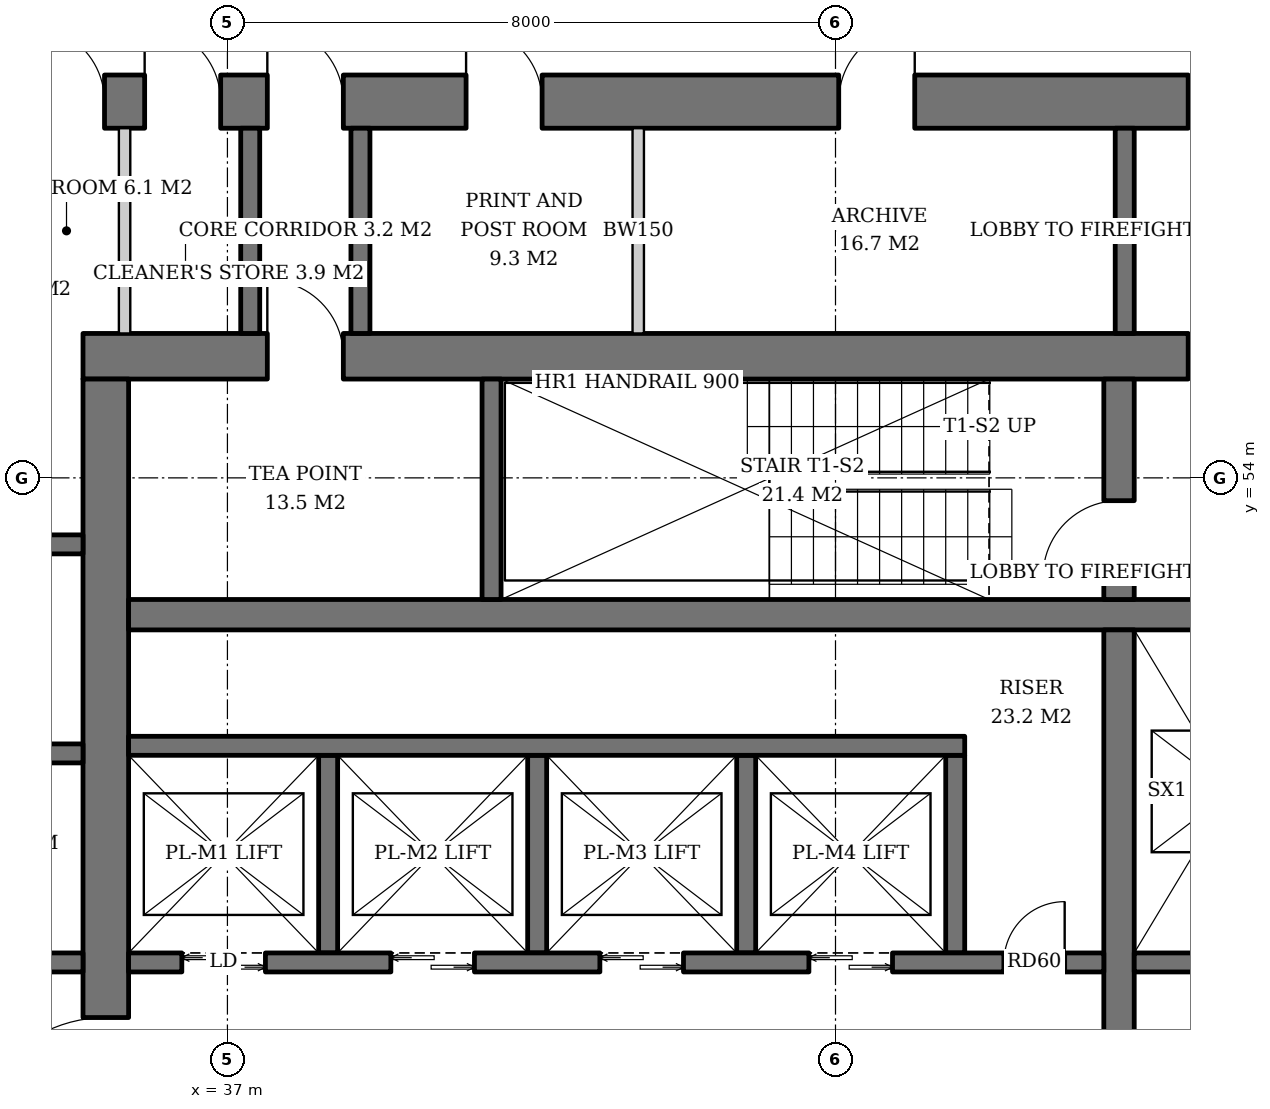
"""IFC4 building model, lengths in metres.
Left out: names, types, materials, properties, quantities, classifications, styles, units other than length and angle.
Written with IfcOpenShell. Run it as: python <this file> out.ifc"""

import sys

from ifc_helpers import new_model, si_unit, direction, frame, frame_2d, origin, place, context, subcontext, project, spatial, rectangle, extrude, element, fill, save


model = new_model("IFC4")
c1 = context("Model", 3, precision=1e-05, world=origin(), true_north=direction((0.0, 1.0)))
c2 = subcontext(c1, "Body", "Model", "MODEL_VIEW")
j1 = project(units=[si_unit("LENGTHUNIT", "METRE"), si_unit("PLANEANGLEUNIT", "RADIAN")], contexts=[c1])
p1 = place(None, origin())
s1 = spatial("IfcSite", under=j1, at=p1, CompositionType="ELEMENT")
p2 = place(p1, origin())
s2 = spatial("IfcBuilding", under=s1, at=p2, CompositionType="ELEMENT")
p3 = place(p2, frame((0.0, 0.0, 150.2)))
s3 = spatial("IfcBuildingStorey", under=s2, at=p3, CompositionType="ELEMENT", Elevation=150.2)
p4 = place(p3, frame((35.1, 55.6, 0.0), z_axis=(0.0, 0.0, 1.0), x_axis=(1.0, 0.0, 0.0)))
e1 = element("IfcWall", 1, at=p4, inside=s3, PredefinedType="SHEAR", context=c2, shape_type="SweptSolid", body=[
    extrude(rectangle(XDim=19.8, YDim=0.6, at=frame_2d((9.9, 0.0))), origin(), (0.0, 0.0, 1.0), 3.8),
])
p5 = place(p4, frame((14.54, 0.0, 0.0)))
e2 = element("IfcOpeningElement", 2, at=p5, cuts=e1, PredefinedType="OPENING", context=c2, shape_type="SweptSolid", body=[
    extrude(rectangle(XDim=1.0, YDim=2.1, at=frame_2d((0.5, 1.05))), frame((0.0, 0.31, 0.0), z_axis=(0.0, -1.0, 0.0), x_axis=(1.0, 0.0, 0.0)), (0.0, 0.0, 1.0), 0.62),
])
p6 = place(p4, frame((2.425, 0.0, 0.0)))
e3 = element("IfcOpeningElement", 3, at=p6, cuts=e1, PredefinedType="OPENING", context=c2, shape_type="SweptSolid", body=[
    extrude(rectangle(XDim=1.0, YDim=2.1, at=frame_2d((0.5, 1.05))), frame((0.0, 0.31, 0.0), z_axis=(0.0, -1.0, 0.0), x_axis=(1.0, 0.0, 0.0)), (0.0, 0.0, 1.0), 0.62),
])
p7 = place(p3, frame((35.4, 36.7, 0.0), z_axis=(0.0, 0.0, 1.0), x_axis=(0.0, 1.0, 0.0)))
e4 = element("IfcWall", 4, at=p7, inside=s3, PredefinedType="SHEAR", context=c2, shape_type="SweptSolid", body=[
    extrude(rectangle(XDim=18.6, YDim=0.6, at=frame_2d((9.3, 0.0))), origin(), (0.0, 0.0, 1.0), 3.8),
])
p8 = place(p7, frame((8.4, 0.0, 0.0)))
e5 = element("IfcOpeningElement", 5, at=p8, cuts=e4, PredefinedType="OPENING", context=c2, shape_type="SweptSolid", body=[
    extrude(rectangle(XDim=1.8, YDim=2.4, at=frame_2d((0.9, 1.2))), frame((0.0, 0.31, 0.0), z_axis=(0.0, -1.0, 0.0), x_axis=(1.0, 0.0, 0.0)), (0.0, 0.0, 1.0), 0.62),
])
p9 = place(p3, frame((31.7, 58.95, 0.0), z_axis=(0.0, 0.0, 1.0), x_axis=(1.0, 0.0, 0.0)))
e6 = element("IfcWall", 6, at=p9, inside=s3, PredefinedType="SHEAR", context=c2, shape_type="SweptSolid", body=[
    extrude(rectangle(XDim=26.6, YDim=0.7, at=frame_2d((13.3, 0.0))), origin(), (0.0, 0.0, 1.0), 3.8),
])
p10 = place(p9, frame((17.94, 0.0, 0.0)))
e7 = element("IfcOpeningElement", 7, at=p10, cuts=e6, PredefinedType="OPENING", context=c2, shape_type="SweptSolid", body=[
    extrude(rectangle(XDim=1.0, YDim=2.1, at=frame_2d((0.5, 1.05))), frame((0.0, 0.36, 0.0), z_axis=(0.0, -1.0, 0.0), x_axis=(1.0, 0.0, 0.0)), (0.0, 0.0, 1.0), 0.72),
])
p11 = place(p9, frame((5.825, 0.0, 0.0)))
e8 = element("IfcOpeningElement", 8, at=p11, cuts=e6, PredefinedType="OPENING", context=c2, shape_type="SweptSolid", body=[
    extrude(rectangle(XDim=1.0, YDim=2.1, at=frame_2d((0.5, 1.05))), frame((0.0, 0.36, 0.0), z_axis=(0.0, -1.0, 0.0), x_axis=(1.0, 0.0, 0.0)), (0.0, 0.0, 1.0), 0.72),
])
p12 = place(p9, frame((1.169, 0.0, 0.0)))
e9 = element("IfcOpeningElement", 9, at=p12, cuts=e6, PredefinedType="OPENING", context=c2, shape_type="SweptSolid", body=[
    extrude(rectangle(XDim=1.0, YDim=2.1, at=frame_2d((0.5, 1.05))), frame((0.0, 0.36, 0.0), z_axis=(0.0, -1.0, 0.0), x_axis=(1.0, 0.0, 0.0)), (0.0, 0.0, 1.0), 0.72),
])
p13 = place(p9, frame((2.683, 0.0, 0.0)))
e10 = element("IfcOpeningElement", 10, at=p13, cuts=e6, PredefinedType="OPENING", context=c2, shape_type="SweptSolid", body=[
    extrude(rectangle(XDim=1.0, YDim=2.1, at=frame_2d((0.5, 1.05))), frame((0.0, 0.36, 0.0), z_axis=(0.0, -1.0, 0.0), x_axis=(1.0, 0.0, 0.0)), (0.0, 0.0, 1.0), 0.72),
])
p14 = place(p9, frame((4.211, 0.0, 0.0)))
e11 = element("IfcOpeningElement", 11, at=p14, cuts=e6, PredefinedType="OPENING", context=c2, shape_type="SweptSolid", body=[
    extrude(rectangle(XDim=1.0, YDim=2.1, at=frame_2d((0.5, 1.05))), frame((0.0, 0.36, 0.0), z_axis=(0.0, -1.0, 0.0), x_axis=(1.0, 0.0, 0.0)), (0.0, 0.0, 1.0), 0.72),
])
p15 = place(p9, frame((8.44, 0.0, 0.0)))
e12 = element("IfcOpeningElement", 12, at=p15, cuts=e6, PredefinedType="OPENING", context=c2, shape_type="SweptSolid", body=[
    extrude(rectangle(XDim=1.0, YDim=2.1, at=frame_2d((0.5, 1.05))), frame((0.0, 0.36, 0.0), z_axis=(0.0, -1.0, 0.0), x_axis=(1.0, 0.0, 0.0)), (0.0, 0.0, 1.0), 0.72),
])
p16 = place(p9, frame((13.342, 0.0, 0.0)))
e13 = element("IfcOpeningElement", 13, at=p16, cuts=e6, PredefinedType="OPENING", context=c2, shape_type="SweptSolid", body=[
    extrude(rectangle(XDim=1.0, YDim=2.1, at=frame_2d((0.5, 1.05))), frame((0.0, 0.36, 0.0), z_axis=(0.0, -1.0, 0.0), x_axis=(1.0, 0.0, 0.0)), (0.0, 0.0, 1.0), 0.72),
])
p17 = place(p9, frame((22.4, 0.0, 0.0)))
e14 = element("IfcOpeningElement", 14, at=p17, cuts=e6, PredefinedType="OPENING", context=c2, shape_type="SweptSolid", body=[
    extrude(rectangle(XDim=1.0, YDim=2.1, at=frame_2d((0.5, 1.05))), frame((0.0, 0.36, 0.0), z_axis=(0.0, -1.0, 0.0), x_axis=(1.0, 0.0, 0.0)), (0.0, 0.0, 1.0), 0.72),
])
p18 = place(p3, frame((35.7, 52.2, 0.0), z_axis=(0.0, 0.0, 1.0), x_axis=(1.0, 0.0, 0.0)))
e15 = element("IfcWall", 15, at=p18, inside=s3, PredefinedType="SHEAR", context=c2, shape_type="SweptSolid", body=[
    extrude(rectangle(XDim=18.6, YDim=0.4, at=frame_2d((9.3, 0.0))), origin(), (0.0, 0.0, 1.0), 3.8),
])
p19 = place(p3, frame((48.73, 40.0, 0.0), z_axis=(0.0, 0.0, 1.0), x_axis=(0.0, 1.0, 0.0)))
e16 = element("IfcWall", 16, at=p19, inside=s3, PredefinedType="SHEAR", context=c2, shape_type="SweptSolid", body=[
    extrude(rectangle(XDim=12.0, YDim=0.4, at=frame_2d((6.0, 0.0))), origin(), (0.0, 0.0, 1.0), 3.8),
])
p20 = place(p3, frame((48.73, 52.4, 0.0), z_axis=(0.0, 0.0, 1.0), x_axis=(0.0, 1.0, 0.0)))
e17 = element("IfcWall", 17, at=p20, inside=s3, PredefinedType="SHEAR", context=c2, shape_type="SweptSolid", body=[
    extrude(rectangle(XDim=2.9, YDim=0.4, at=frame_2d((1.45, 0.0))), origin(), (0.0, 0.0, 1.0), 3.8),
])
p21 = place(p20, frame((0.3, 0.0, 0.0)))
e18 = element("IfcOpeningElement", 18, at=p21, cuts=e17, PredefinedType="OPENING", context=c2, shape_type="SweptSolid", body=[
    extrude(rectangle(XDim=1.0, YDim=2.1, at=frame_2d((0.5, 1.05))), frame((0.0, 0.21, 0.0), z_axis=(0.0, -1.0, 0.0), x_axis=(1.0, 0.0, 0.0)), (0.0, 0.0, 1.0), 0.42),
])
p22 = place(p3, frame((40.475, 52.4, 0.0), z_axis=(0.0, 0.0, 1.0), x_axis=(0.0, 1.0, 0.0)))
e19 = element("IfcWall", 19, at=p22, inside=s3, PredefinedType="SHEAR", context=c2, shape_type="SweptSolid", body=[
    extrude(rectangle(XDim=2.9, YDim=0.25, at=frame_2d((1.45, 0.0))), origin(), (0.0, 0.0, 1.0), 3.8),
])
for number, where, z_axis, x_axis in (
    (20, (38.325, 47.75, 0.0), (0.0, 0.0, 1.0), (0.0, 1.0, 0.0)),
    (21, (41.075, 47.75, 0.0), (0.0, 0.0, 1.0), (0.0, 1.0, 0.0)),
    (22, (43.825, 47.75, 0.0), (0.0, 0.0, 1.0), (0.0, 1.0, 0.0)),
    (23, (46.575, 47.75, 0.0), (0.0, 0.0, 1.0), (0.0, 1.0, 0.0)),
):
    element("IfcWall", number, at=place(p3, frame(where, z_axis=z_axis, x_axis=x_axis)), inside=s3, PredefinedType="SHEAR", context=c2, shape_type="SweptSolid", body=[
        extrude(rectangle(XDim=2.6, YDim=0.25, at=frame_2d((1.3, 0.0))), origin(), (0.0, 0.0, 1.0), 3.8),
    ])
p23 = place(p3, frame((35.7, 50.475, 0.0), z_axis=(0.0, 0.0, 1.0), x_axis=(1.0, 0.0, 0.0)))
e24 = element("IfcWall", 24, at=p23, inside=s3, PredefinedType="SHEAR", context=c2, shape_type="SweptSolid", body=[
    extrude(rectangle(XDim=11.0, YDim=0.25, at=frame_2d((5.5, 0.0))), origin(), (0.0, 0.0, 1.0), 3.8),
])
p24 = place(p3, frame((35.7, 47.625, 0.0), z_axis=(0.0, 0.0, 1.0), x_axis=(1.0, 0.0, 0.0)))
e25 = element("IfcWall", 25, at=p24, inside=s3, PredefinedType="SHEAR", context=c2, shape_type="SweptSolid", body=[
    extrude(rectangle(XDim=12.83, YDim=0.25, at=frame_2d((6.415, 0.0))), origin(), (0.0, 0.0, 1.0), 3.8),
])
p25 = place(p24, frame((0.7, 0.0, 0.0)))
e26 = element("IfcOpeningElement", 26, at=p25, cuts=e25, PredefinedType="OPENING", context=c2, shape_type="SweptSolid", body=[
    extrude(rectangle(XDim=1.1, YDim=2.2, at=frame_2d((0.55, 1.1))), frame((0.0, 0.135, 0.0), z_axis=(0.0, -1.0, 0.0), x_axis=(1.0, 0.0, 0.0)), (0.0, 0.0, 1.0), 0.27),
])
p26 = place(p24, frame((3.45, 0.0, 0.0)))
e27 = element("IfcOpeningElement", 27, at=p26, cuts=e25, PredefinedType="OPENING", context=c2, shape_type="SweptSolid", body=[
    extrude(rectangle(XDim=1.1, YDim=2.2, at=frame_2d((0.55, 1.1))), frame((0.0, 0.135, 0.0), z_axis=(0.0, -1.0, 0.0), x_axis=(1.0, 0.0, 0.0)), (0.0, 0.0, 1.0), 0.27),
])
p27 = place(p24, frame((6.2, 0.0, 0.0)))
e28 = element("IfcOpeningElement", 28, at=p27, cuts=e25, PredefinedType="OPENING", context=c2, shape_type="SweptSolid", body=[
    extrude(rectangle(XDim=1.1, YDim=2.2, at=frame_2d((0.55, 1.1))), frame((0.0, 0.135, 0.0), z_axis=(0.0, -1.0, 0.0), x_axis=(1.0, 0.0, 0.0)), (0.0, 0.0, 1.0), 0.27),
])
p28 = place(p24, frame((8.95, 0.0, 0.0)))
e29 = element("IfcOpeningElement", 29, at=p28, cuts=e25, PredefinedType="OPENING", context=c2, shape_type="SweptSolid", body=[
    extrude(rectangle(XDim=1.1, YDim=2.2, at=frame_2d((0.55, 1.1))), frame((0.0, 0.135, 0.0), z_axis=(0.0, -1.0, 0.0), x_axis=(1.0, 0.0, 0.0)), (0.0, 0.0, 1.0), 0.27),
])
p29 = place(p24, frame((11.515, 0.0, 0.0)))
e30 = element("IfcOpeningElement", 30, at=p29, cuts=e25, PredefinedType="OPENING", context=c2, shape_type="SweptSolid", body=[
    extrude(rectangle(XDim=0.8, YDim=2.0, at=frame_2d((0.4, 1.0))), frame((0.0, 0.135, 0.0), z_axis=(0.0, -1.0, 0.0), x_axis=(1.0, 0.0, 0.0)), (0.0, 0.0, 1.0), 0.27),
])
p30 = place(p3, frame((48.93, 47.625, 0.0), z_axis=(0.0, 0.0, 1.0), x_axis=(1.0, 0.0, 0.0)))
e31 = element("IfcWall", 31, at=p30, inside=s3, PredefinedType="SHEAR", context=c2, shape_type="SweptSolid", body=[
    extrude(rectangle(XDim=5.37, YDim=0.25, at=frame_2d((2.685, 0.0))), origin(), (0.0, 0.0, 1.0), 3.8),
])
for number, where, z_axis, x_axis in (
    (32, (32.4, 47.625, 0.0), (0.0, 0.0, 1.0), (1.0, 0.0, 0.0)),
    (33, (32.4, 50.375, 0.0), (0.0, 0.0, 1.0), (1.0, 0.0, 0.0)),
    (34, (32.4, 53.125, 0.0), (0.0, 0.0, 1.0), (1.0, 0.0, 0.0)),
):
    element("IfcWall", number, at=place(p3, frame(where, z_axis=z_axis, x_axis=x_axis)), inside=s3, PredefinedType="SHEAR", context=c2, shape_type="SweptSolid", body=[
        extrude(rectangle(XDim=2.7, YDim=0.25, at=frame_2d((1.35, 0.0))), origin(), (0.0, 0.0, 1.0), 3.8),
    ])
for number, where, z_axis, x_axis in (
    (35, (48.805, 55.9, 0.0), (0.0, 0.0, 1.0), (0.0, 1.0, 0.0)),
    (36, (37.3, 55.9, 0.0), (0.0, 0.0, 1.0), (0.0, 1.0, 0.0)),
    (37, (38.75, 55.9, 0.0), (0.0, 0.0, 1.0), (0.0, 1.0, 0.0)),
):
    element("IfcWall", number, at=place(p3, frame(where, z_axis=z_axis, x_axis=x_axis)), inside=s3, PredefinedType="SOLIDWALL", context=c2, shape_type="SweptSolid", body=[
        extrude(rectangle(XDim=2.7, YDim=0.25, at=frame_2d((1.35, 0.0))), origin(), (0.0, 0.0, 1.0), 3.62),
    ])
for number, where, z_axis, x_axis in (
    (38, (35.647, 55.9, 0.0), (0.0, 0.0, 1.0), (0.0, 1.0, 0.0)),
    (39, (42.405, 55.9, 0.0), (0.0, 0.0, 1.0), (0.0, 1.0, 0.0)),
):
    element("IfcWall", number, at=place(p3, frame(where, z_axis=z_axis, x_axis=x_axis)), inside=s3, PredefinedType="SOLIDWALL", context=c2, shape_type="SweptSolid", body=[
        extrude(rectangle(XDim=2.7, YDim=0.15, at=frame_2d((1.35, 0.0))), origin(), (0.0, 0.0, 1.0), 3.62),
    ])
p31 = place(p25, origin())
e40 = element("IfcDoor", 40, at=p31, inside=s3, OperationType="DOUBLE_DOOR_SLIDING", PredefinedType="DOOR", context=c2, shape_type="SweptSolid", body=[
    extrude(rectangle(XDim=1.1, YDim=2.2, at=frame_2d((0.55, 1.1))), frame((0.0, 0.025, 0.0), z_axis=(0.0, -1.0, 0.0), x_axis=(1.0, 0.0, 0.0)), (0.0, 0.0, 1.0), 0.05),
])
fill(e26, e40)
p32 = place(p26, origin())
e41 = element("IfcDoor", 41, at=p32, inside=s3, OperationType="DOUBLE_DOOR_SLIDING", PredefinedType="DOOR", context=c2, shape_type="SweptSolid", body=[
    extrude(rectangle(XDim=1.1, YDim=2.2, at=frame_2d((0.55, 1.1))), frame((0.0, 0.025, 0.0), z_axis=(0.0, -1.0, 0.0), x_axis=(1.0, 0.0, 0.0)), (0.0, 0.0, 1.0), 0.05),
])
fill(e27, e41)
p33 = place(p27, origin())
e42 = element("IfcDoor", 42, at=p33, inside=s3, OperationType="DOUBLE_DOOR_SLIDING", PredefinedType="DOOR", context=c2, shape_type="SweptSolid", body=[
    extrude(rectangle(XDim=1.1, YDim=2.2, at=frame_2d((0.55, 1.1))), frame((0.0, 0.025, 0.0), z_axis=(0.0, -1.0, 0.0), x_axis=(1.0, 0.0, 0.0)), (0.0, 0.0, 1.0), 0.05),
])
fill(e28, e42)
p34 = place(p28, origin())
e43 = element("IfcDoor", 43, at=p34, inside=s3, OperationType="DOUBLE_DOOR_SLIDING", PredefinedType="DOOR", context=c2, shape_type="SweptSolid", body=[
    extrude(rectangle(XDim=1.1, YDim=2.2, at=frame_2d((0.55, 1.1))), frame((0.0, 0.025, 0.0), z_axis=(0.0, -1.0, 0.0), x_axis=(1.0, 0.0, 0.0)), (0.0, 0.0, 1.0), 0.05),
])
fill(e29, e43)
p35 = place(p29, origin())
e44 = element("IfcDoor", 44, at=p35, inside=s3, OperationType="SINGLE_SWING_RIGHT", PredefinedType="DOOR", context=c2, shape_type="SweptSolid", body=[
    extrude(rectangle(XDim=0.8, YDim=2.0, at=frame_2d((0.4, 1.0))), frame((0.0, 0.025, 0.0), z_axis=(0.0, -1.0, 0.0), x_axis=(1.0, 0.0, 0.0)), (0.0, 0.0, 1.0), 0.05),
])
fill(e30, e44)
p36 = place(p21, origin())
e45 = element("IfcDoor", 45, at=p36, inside=s3, OperationType="SINGLE_SWING_LEFT", PredefinedType="DOOR", context=c2, shape_type="SweptSolid", body=[
    extrude(rectangle(XDim=1.0, YDim=2.1, at=frame_2d((0.5, 1.05))), frame((0.0, 0.025, 0.0), z_axis=(0.0, -1.0, 0.0), x_axis=(1.0, 0.0, 0.0)), (0.0, 0.0, 1.0), 0.05),
])
fill(e18, e45)
p37 = place(p5, origin())
e46 = element("IfcDoor", 46, at=p37, inside=s3, OperationType="SINGLE_SWING_RIGHT", PredefinedType="DOOR", context=c2, shape_type="SweptSolid", body=[
    extrude(rectangle(XDim=1.0, YDim=2.1, at=frame_2d((0.5, 1.05))), frame((0.0, 0.025, 0.0), z_axis=(0.0, -1.0, 0.0), x_axis=(1.0, 0.0, 0.0)), (0.0, 0.0, 1.0), 0.05),
])
fill(e2, e46)
p38 = place(p8, origin())
e47 = element("IfcDoor", 47, at=p38, inside=s3, OperationType="DOUBLE_DOOR_SINGLE_SWING", PredefinedType="DOOR", context=c2, shape_type="SweptSolid", body=[
    extrude(rectangle(XDim=1.8, YDim=2.4, at=frame_2d((0.9, 1.2))), frame((0.0, 0.025, 0.0), z_axis=(0.0, -1.0, 0.0), x_axis=(1.0, 0.0, 0.0)), (0.0, 0.0, 1.0), 0.05),
])
fill(e5, e47)
p39 = place(p10, origin())
e48 = element("IfcDoor", 48, at=p39, inside=s3, OperationType="SINGLE_SWING_RIGHT", PredefinedType="DOOR", context=c2, shape_type="SweptSolid", body=[
    extrude(rectangle(XDim=1.0, YDim=2.1, at=frame_2d((0.5, 1.05))), frame((0.0, 0.025, 0.0), z_axis=(0.0, -1.0, 0.0), x_axis=(1.0, 0.0, 0.0)), (0.0, 0.0, 1.0), 0.05),
])
fill(e7, e48)
p40 = place(p11, origin())
e49 = element("IfcDoor", 49, at=p40, inside=s3, OperationType="SINGLE_SWING_LEFT", PredefinedType="DOOR", context=c2, shape_type="SweptSolid", body=[
    extrude(rectangle(XDim=1.0, YDim=2.1, at=frame_2d((0.5, 1.05))), frame((0.0, 0.025, 0.0), z_axis=(0.0, -1.0, 0.0), x_axis=(1.0, 0.0, 0.0)), (0.0, 0.0, 1.0), 0.05),
])
fill(e8, e49)
p41 = place(p6, origin())
e50 = element("IfcDoor", 50, at=p41, inside=s3, OperationType="SINGLE_SWING_LEFT", PredefinedType="DOOR", context=c2, shape_type="SweptSolid", body=[
    extrude(rectangle(XDim=1.0, YDim=2.1, at=frame_2d((0.5, 1.05))), frame((0.0, -0.24, 0.0), z_axis=(0.0, -1.0, 0.0), x_axis=(1.0, 0.0, 0.0)), (0.0, 0.0, 1.0), 0.05),
])
fill(e3, e50)
p42 = place(p13, origin())
e51 = element("IfcDoor", 51, at=p42, inside=s3, OperationType="SINGLE_SWING_LEFT", PredefinedType="DOOR", context=c2, shape_type="SweptSolid", body=[
    extrude(rectangle(XDim=1.0, YDim=2.1, at=frame_2d((0.5, 1.05))), frame((0.0, -0.29, 0.0), z_axis=(0.0, -1.0, 0.0), x_axis=(1.0, 0.0, 0.0)), (0.0, 0.0, 1.0), 0.05),
])
fill(e10, e51)
p43 = place(p14, origin())
e52 = element("IfcDoor", 52, at=p43, inside=s3, OperationType="SINGLE_SWING_LEFT", PredefinedType="DOOR", context=c2, shape_type="SweptSolid", body=[
    extrude(rectangle(XDim=1.0, YDim=2.1, at=frame_2d((0.5, 1.05))), frame((0.0, -0.29, 0.0), z_axis=(0.0, -1.0, 0.0), x_axis=(1.0, 0.0, 0.0)), (0.0, 0.0, 1.0), 0.05),
])
fill(e11, e52)
p44 = place(p15, origin())
e53 = element("IfcDoor", 53, at=p44, inside=s3, OperationType="SINGLE_SWING_LEFT", PredefinedType="DOOR", context=c2, shape_type="SweptSolid", body=[
    extrude(rectangle(XDim=1.0, YDim=2.1, at=frame_2d((0.5, 1.05))), frame((0.0, -0.29, 0.0), z_axis=(0.0, -1.0, 0.0), x_axis=(1.0, 0.0, 0.0)), (0.0, 0.0, 1.0), 0.05),
])
fill(e12, e53)
p45 = place(p16, origin())
e54 = element("IfcDoor", 54, at=p45, inside=s3, OperationType="SINGLE_SWING_RIGHT", PredefinedType="DOOR", context=c2, shape_type="SweptSolid", body=[
    extrude(rectangle(XDim=1.0, YDim=2.1, at=frame_2d((0.5, 1.05))), frame((0.0, -0.29, 0.0), z_axis=(0.0, -1.0, 0.0), x_axis=(1.0, 0.0, 0.0)), (0.0, 0.0, 1.0), 0.05),
])
fill(e13, e54)
save(model, sys.argv[1])
